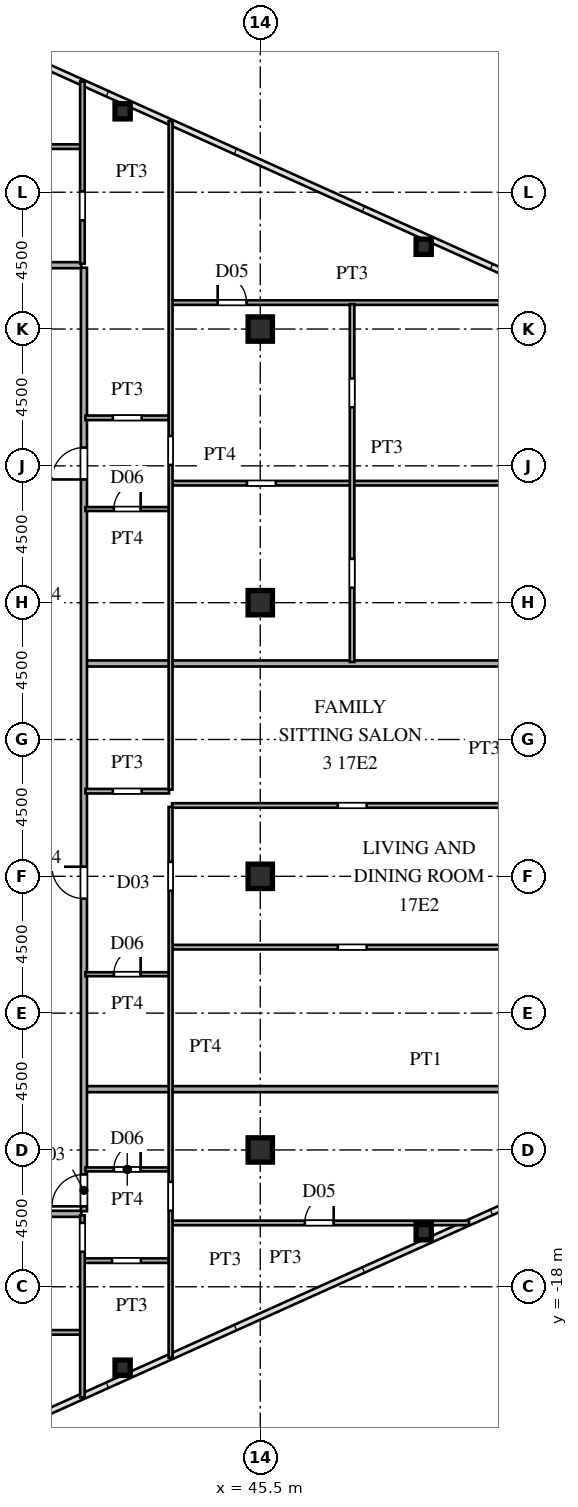
"""IFC4 building model, lengths in metres.
Left out: names, types, materials, properties, quantities, classifications, styles, units other than length and angle.
Written with IfcOpenShell. Run it as: python <this file> out.ifc"""

import sys

from ifc_helpers import new_model, si_unit, direction, frame, frame_2d, origin, origin_2d, place, context, subcontext, project, spatial, rectangle, hollow_rectangle, i_section, extrude, source, transform, mapped, element, fill, save


model = new_model("IFC4")
c1 = context("Model", 3, precision=1e-05, world=origin(), true_north=direction((0.0, 1.0)))
c2 = subcontext(c1, "Body", "Model", "MODEL_VIEW")
j1 = project(units=[si_unit("LENGTHUNIT", "METRE"), si_unit("PLANEANGLEUNIT", "RADIAN")], contexts=[c1])
p1 = place(None, origin())
s1 = spatial("IfcSite", under=j1, at=p1, CompositionType="ELEMENT")
p2 = place(p1, origin())
s2 = spatial("IfcBuilding", under=s1, at=p2, CompositionType="ELEMENT")
p3 = place(p2, frame((0.0, 0.0, 65.7)))
s3 = spatial("IfcBuildingStorey", under=s2, at=p3, CompositionType="ELEMENT", Elevation=65.7)
m1 = source(origin(), c2, "Body", "SweptSolid", [
    extrude(i_section(OverallWidth=0.8, OverallDepth=0.8, WebThickness=0.032, FlangeThickness=0.05, at=origin_2d()), origin(), (0.0, 0.0, 1.0), 3.6),
])
for number, where, z_axis, x_axis in (
    (1, (45.5, -13.5, 0.0), (0.0, 0.0, 1.0), (1.0, 0.0, 0.0)),
    (2, (45.5, -4.5, 0.0), (0.0, 0.0, 1.0), (1.0, 0.0, 0.0)),
    (3, (45.5, 4.5, 0.0), (0.0, 0.0, 1.0), (1.0, 0.0, 0.0)),
    (4, (45.5, 13.5, 0.0), (0.0, 0.0, 1.0), (1.0, 0.0, 0.0)),
):
    element("IfcColumn", number, at=place(p3, frame(where, z_axis=z_axis, x_axis=x_axis)), inside=s3, PredefinedType="COLUMN", context=c2, shape_type="MappedRepresentation", body=[
        mapped(m1, transform((0.0, 0.0, 0.0), scale=1.0)),
    ])
m2 = source(origin(), c2, "Body", "SweptSolid", [
    extrude(hollow_rectangle(XDim=0.5, YDim=0.5, WallThickness=0.02, at=origin_2d()), origin(), (0.0, 0.0, 1.0), 3.6),
])
for number, where, z_axis, x_axis in (
    (5, (40.973, -20.661, 0.0), (0.0, 0.0, 1.0), (1.0, 0.0, 0.0)),
    (6, (50.875, -16.205, 0.0), (0.0, 0.0, 1.0), (1.0, 0.0, 0.0)),
    (7, (40.973, 20.661, 0.0), (0.0, 0.0, 1.0), (1.0, 0.0, 0.0)),
    (8, (50.875, 16.205, 0.0), (0.0, 0.0, 1.0), (1.0, 0.0, 0.0)),
):
    element("IfcColumn", number, at=place(p3, frame(where, z_axis=z_axis, x_axis=x_axis)), inside=s3, PredefinedType="COLUMN", context=c2, shape_type="MappedRepresentation", body=[
        mapped(m2, transform((0.0, 0.0, 0.0), scale=1.0)),
    ])
p4 = place(p3, frame((27.465, -19.5, 0.0), z_axis=(0.0, 0.0, 1.0), x_axis=(1.0, 0.0, 0.0)))
e9 = element("IfcWall", 9, at=p4, inside=s3, PredefinedType="PARTITIONING", context=c2, shape_type="SweptSolid", body=[
    extrude(rectangle(XDim=12.135, YDim=0.15, at=frame_2d((6.067, 0.0))), origin(), (0.0, 0.0, 1.0), 3.38),
])
p5 = place(p4, frame((5.635, 0.0, 0.0)))
e10 = element("IfcOpeningElement", 10, at=p5, cuts=e9, PredefinedType="OPENING", context=c2, shape_type="SweptSolid", body=[
    extrude(rectangle(XDim=0.95, YDim=2.15, at=frame_2d((0.475, 1.075))), frame((0.0, 0.085, 0.0), z_axis=(0.0, -1.0, 0.0), x_axis=(1.0, 0.0, 0.0)), (0.0, 0.0, 1.0), 0.17),
])
p6 = place(p3, frame((39.7, -17.14, 0.0), z_axis=(0.0, 0.0, 1.0), x_axis=(1.0, 0.0, 0.0)))
e11 = element("IfcWall", 11, at=p6, inside=s3, PredefinedType="PARTITIONING", context=c2, shape_type="SweptSolid", body=[
    extrude(rectangle(XDim=2.8, YDim=0.15, at=frame_2d((1.4, 0.0))), origin(), (0.0, 0.0, 1.0), 3.38),
])
p7 = place(p6, frame((0.925, 0.0, 0.0)))
e12 = element("IfcOpeningElement", 12, at=p7, cuts=e11, PredefinedType="OPENING", context=c2, shape_type="SweptSolid", body=[
    extrude(rectangle(XDim=0.95, YDim=2.15, at=frame_2d((0.475, 1.075))), frame((0.0, 0.085, 0.0), z_axis=(0.0, -1.0, 0.0), x_axis=(1.0, 0.0, 0.0)), (0.0, 0.0, 1.0), 0.17),
])
p8 = place(p3, frame((42.6, -15.9, 0.0), z_axis=(0.0, 0.0, 1.0), x_axis=(1.0, 0.0, 0.0)))
e13 = element("IfcWall", 13, at=p8, inside=s3, PredefinedType="PARTITIONING", context=c2, shape_type="SweptSolid", body=[
    extrude(rectangle(XDim=9.765, YDim=0.15, at=frame_2d((4.882, 0.0))), origin(), (0.0, 0.0, 1.0), 3.38),
])
p9 = place(p8, frame((4.365, 0.0, 0.0)))
e14 = element("IfcOpeningElement", 14, at=p9, cuts=e13, PredefinedType="OPENING", context=c2, shape_type="SweptSolid", body=[
    extrude(rectangle(XDim=0.95, YDim=2.15, at=frame_2d((0.475, 1.075))), frame((0.0, 0.085, 0.0), z_axis=(0.0, -1.0, 0.0), x_axis=(1.0, 0.0, 0.0)), (0.0, 0.0, 1.0), 0.17),
])
p10 = place(p3, frame((36.585, -15.6, 0.0), z_axis=(0.0, 0.0, 1.0), x_axis=(1.0, 0.0, 0.0)))
e15 = element("IfcWall", 15, at=p10, inside=s3, PredefinedType="PARTITIONING", context=c2, shape_type="SweptSolid", body=[
    extrude(rectangle(XDim=3.03, YDim=0.2, at=frame_2d((1.515, 0.0))), origin(), (0.0, 0.0, 1.0), 3.38),
])
p11 = place(p3, frame((39.75, -14.14, 0.0), z_axis=(0.0, 0.0, 1.0), x_axis=(1.0, 0.0, 0.0)))
e16 = element("IfcWall", 16, at=p11, inside=s3, PredefinedType="PARTITIONING", context=c2, shape_type="SweptSolid", body=[
    extrude(rectangle(XDim=2.75, YDim=0.13, at=frame_2d((1.375, 0.0))), origin(), (0.0, 0.0, 1.0), 3.38),
])
p12 = place(p11, frame((0.935, 0.0, 0.0)))
e17 = element("IfcOpeningElement", 17, at=p12, cuts=e16, PredefinedType="OPENING", context=c2, shape_type="SweptSolid", body=[
    extrude(rectangle(XDim=0.88, YDim=2.1, at=frame_2d((0.44, 1.05))), frame((0.0, 0.075, 0.0), z_axis=(0.0, -1.0, 0.0), x_axis=(1.0, 0.0, 0.0)), (0.0, 0.0, 1.0), 0.15),
])
p13 = place(p3, frame((39.78, -11.5, 0.0), z_axis=(0.0, 0.0, 1.0), x_axis=(1.0, 0.0, 0.0)))
e18 = element("IfcWall", 18, at=p13, inside=s3, PredefinedType="PARTITIONING", context=c2, shape_type="SweptSolid", body=[
    extrude(rectangle(XDim=22.343, YDim=0.2, at=frame_2d((11.171, 0.0))), origin(), (0.0, 0.0, 1.0), 3.38),
])
p14 = place(p3, frame((39.75, -7.72, 0.0), z_axis=(0.0, 0.0, 1.0), x_axis=(1.0, 0.0, 0.0)))
e19 = element("IfcWall", 19, at=p14, inside=s3, PredefinedType="PARTITIONING", context=c2, shape_type="SweptSolid", body=[
    extrude(rectangle(XDim=2.75, YDim=0.13, at=frame_2d((1.375, 0.0))), origin(), (0.0, 0.0, 1.0), 3.38),
])
p15 = place(p14, frame((0.935, 0.0, 0.0)))
e20 = element("IfcOpeningElement", 20, at=p15, cuts=e19, PredefinedType="OPENING", context=c2, shape_type="SweptSolid", body=[
    extrude(rectangle(XDim=0.88, YDim=2.1, at=frame_2d((0.44, 1.05))), frame((0.0, 0.075, 0.0), z_axis=(0.0, -1.0, 0.0), x_axis=(1.0, 0.0, 0.0)), (0.0, 0.0, 1.0), 0.15),
])
p16 = place(p3, frame((42.6, -6.83, 0.0), z_axis=(0.0, 0.0, 1.0), x_axis=(1.0, 0.0, 0.0)))
e21 = element("IfcWall", 21, at=p16, inside=s3, PredefinedType="PARTITIONING", context=c2, shape_type="SweptSolid", body=[
    extrude(rectangle(XDim=28.275, YDim=0.15, at=frame_2d((14.137, 0.0))), origin(), (0.0, 0.0, 1.0), 3.38),
])
p17 = place(p16, frame((5.45, 0.0, 0.0)))
e22 = element("IfcOpeningElement", 22, at=p17, cuts=e21, PredefinedType="OPENING", context=c2, shape_type="SweptSolid", body=[
    extrude(rectangle(XDim=0.95, YDim=2.15, at=frame_2d((0.475, 1.075))), frame((0.0, 0.085, 0.0), z_axis=(0.0, -1.0, 0.0), x_axis=(1.0, 0.0, 0.0)), (0.0, 0.0, 1.0), 0.17),
])
p18 = place(p16, frame((14.275, 0.0, 0.0)))
e23 = element("IfcOpeningElement", 23, at=p18, cuts=e21, PredefinedType="OPENING", context=c2, shape_type="SweptSolid", body=[
    extrude(rectangle(XDim=0.95, YDim=2.15, at=frame_2d((0.475, 1.075))), frame((0.0, 0.085, 0.0), z_axis=(0.0, -1.0, 0.0), x_axis=(1.0, 0.0, 0.0)), (0.0, 0.0, 1.0), 0.17),
])
p19 = place(p3, frame((42.6, -2.17, 0.0), z_axis=(0.0, 0.0, 1.0), x_axis=(1.0, 0.0, 0.0)))
e24 = element("IfcWall", 24, at=p19, inside=s3, PredefinedType="PARTITIONING", context=c2, shape_type="SweptSolid", body=[
    extrude(rectangle(XDim=28.435, YDim=0.15, at=frame_2d((14.217, 0.0))), origin(), (0.0, 0.0, 1.0), 3.38),
])
p20 = place(p19, frame((5.45, 0.0, 0.0)))
e25 = element("IfcOpeningElement", 25, at=p20, cuts=e24, PredefinedType="OPENING", context=c2, shape_type="SweptSolid", body=[
    extrude(rectangle(XDim=0.95, YDim=2.15, at=frame_2d((0.475, 1.075))), frame((0.0, 0.085, 0.0), z_axis=(0.0, -1.0, 0.0), x_axis=(1.0, 0.0, 0.0)), (0.0, 0.0, 1.0), 0.17),
])
p21 = place(p19, frame((14.275, 0.0, 0.0)))
e26 = element("IfcOpeningElement", 26, at=p21, cuts=e24, PredefinedType="OPENING", context=c2, shape_type="SweptSolid", body=[
    extrude(rectangle(XDim=0.95, YDim=2.15, at=frame_2d((0.475, 1.075))), frame((0.0, 0.085, 0.0), z_axis=(0.0, -1.0, 0.0), x_axis=(1.0, 0.0, 0.0)), (0.0, 0.0, 1.0), 0.17),
])
p22 = place(p3, frame((39.75, -1.7, 0.0), z_axis=(0.0, 0.0, 1.0), x_axis=(1.0, 0.0, 0.0)))
e27 = element("IfcWall", 27, at=p22, inside=s3, PredefinedType="PARTITIONING", context=c2, shape_type="SweptSolid", body=[
    extrude(rectangle(XDim=2.75, YDim=0.15, at=frame_2d((1.375, 0.0))), origin(), (0.0, 0.0, 1.0), 3.38),
])
p23 = place(p22, frame((0.9, 0.0, 0.0)))
e28 = element("IfcOpeningElement", 28, at=p23, cuts=e27, PredefinedType="OPENING", context=c2, shape_type="SweptSolid", body=[
    extrude(rectangle(XDim=0.95, YDim=2.15, at=frame_2d((0.475, 1.075))), frame((0.0, 0.085, 0.0), z_axis=(0.0, -1.0, 0.0), x_axis=(1.0, 0.0, 0.0)), (0.0, 0.0, 1.0), 0.17),
])
p24 = place(p3, frame((39.78, 2.5, 0.0), z_axis=(0.0, 0.0, 1.0), x_axis=(1.0, 0.0, 0.0)))
e29 = element("IfcWall", 29, at=p24, inside=s3, PredefinedType="PARTITIONING", context=c2, shape_type="SweptSolid", body=[
    extrude(rectangle(XDim=31.225, YDim=0.2, at=frame_2d((15.612, 0.0))), origin(), (0.0, 0.0, 1.0), 3.38),
])
p25 = place(p3, frame((39.75, 7.58, 0.0), z_axis=(0.0, 0.0, 1.0), x_axis=(1.0, 0.0, 0.0)))
e30 = element("IfcWall", 30, at=p25, inside=s3, PredefinedType="PARTITIONING", context=c2, shape_type="SweptSolid", body=[
    extrude(rectangle(XDim=2.75, YDim=0.13, at=frame_2d((1.375, 0.0))), origin(), (0.0, 0.0, 1.0), 3.38),
])
p26 = place(p25, frame((0.935, 0.0, 0.0)))
e31 = element("IfcOpeningElement", 31, at=p26, cuts=e30, PredefinedType="OPENING", context=c2, shape_type="SweptSolid", body=[
    extrude(rectangle(XDim=0.88, YDim=2.1, at=frame_2d((0.44, 1.05))), frame((0.0, 0.075, 0.0), z_axis=(0.0, -1.0, 0.0), x_axis=(1.0, 0.0, 0.0)), (0.0, 0.0, 1.0), 0.15),
])
p27 = place(p3, frame((42.6, 8.43, 0.0), z_axis=(0.0, 0.0, 1.0), x_axis=(1.0, 0.0, 0.0)))
e32 = element("IfcWall", 32, at=p27, inside=s3, PredefinedType="PARTITIONING", context=c2, shape_type="SweptSolid", body=[
    extrude(rectangle(XDim=26.359, YDim=0.15, at=frame_2d((13.179, 0.0))), origin(), (0.0, 0.0, 1.0), 3.38),
])
p28 = place(p27, frame((2.462, 0.0, 0.0)))
e33 = element("IfcOpeningElement", 33, at=p28, cuts=e32, PredefinedType="OPENING", context=c2, shape_type="SweptSolid", body=[
    extrude(rectangle(XDim=0.95, YDim=2.15, at=frame_2d((0.475, 1.075))), frame((0.0, 0.085, 0.0), z_axis=(0.0, -1.0, 0.0), x_axis=(1.0, 0.0, 0.0)), (0.0, 0.0, 1.0), 0.17),
])
p29 = place(p3, frame((39.75, 10.58, 0.0), z_axis=(0.0, 0.0, 1.0), x_axis=(1.0, 0.0, 0.0)))
e34 = element("IfcWall", 34, at=p29, inside=s3, PredefinedType="PARTITIONING", context=c2, shape_type="SweptSolid", body=[
    extrude(rectangle(XDim=2.75, YDim=0.15, at=frame_2d((1.375, 0.0))), origin(), (0.0, 0.0, 1.0), 3.38),
])
p30 = place(p29, frame((0.9, 0.0, 0.0)))
e35 = element("IfcOpeningElement", 35, at=p30, cuts=e34, PredefinedType="OPENING", context=c2, shape_type="SweptSolid", body=[
    extrude(rectangle(XDim=0.95, YDim=2.15, at=frame_2d((0.475, 1.075))), frame((0.0, 0.085, 0.0), z_axis=(0.0, -1.0, 0.0), x_axis=(1.0, 0.0, 0.0)), (0.0, 0.0, 1.0), 0.17),
])
p31 = place(p3, frame((42.6, 14.37, 0.0), z_axis=(0.0, 0.0, 1.0), x_axis=(1.0, 0.0, 0.0)))
e36 = element("IfcWall", 36, at=p31, inside=s3, PredefinedType="PARTITIONING", context=c2, shape_type="SweptSolid", body=[
    extrude(rectangle(XDim=11.85, YDim=0.15, at=frame_2d((5.925, 0.0))), origin(), (0.0, 0.0, 1.0), 3.38),
])
p32 = place(p31, frame((1.5, 0.0, 0.0)))
e37 = element("IfcOpeningElement", 37, at=p32, cuts=e36, PredefinedType="OPENING", context=c2, shape_type="SweptSolid", body=[
    extrude(rectangle(XDim=0.95, YDim=2.15, at=frame_2d((0.475, 1.075))), frame((0.0, 0.085, 0.0), z_axis=(0.0, -1.0, 0.0), x_axis=(1.0, 0.0, 0.0)), (0.0, 0.0, 1.0), 0.17),
])
p33 = place(p3, frame((36.585, 15.6, 0.0), z_axis=(0.0, 0.0, 1.0), x_axis=(1.0, 0.0, 0.0)))
e38 = element("IfcWall", 38, at=p33, inside=s3, PredefinedType="PARTITIONING", context=c2, shape_type="SweptSolid", body=[
    extrude(rectangle(XDim=3.03, YDim=0.2, at=frame_2d((1.515, 0.0))), origin(), (0.0, 0.0, 1.0), 3.38),
])
p34 = place(p3, frame((27.465, 19.5, 0.0), z_axis=(0.0, 0.0, 1.0), x_axis=(1.0, 0.0, 0.0)))
e39 = element("IfcWall", 39, at=p34, inside=s3, PredefinedType="PARTITIONING", context=c2, shape_type="SweptSolid", body=[
    extrude(rectangle(XDim=12.135, YDim=0.15, at=frame_2d((6.067, 0.0))), origin(), (0.0, 0.0, 1.0), 3.38),
])
p35 = place(p34, frame((5.635, 0.0, 0.0)))
e40 = element("IfcOpeningElement", 40, at=p35, cuts=e39, PredefinedType="OPENING", context=c2, shape_type="SweptSolid", body=[
    extrude(rectangle(XDim=0.95, YDim=2.15, at=frame_2d((0.475, 1.075))), frame((0.0, 0.085, 0.0), z_axis=(0.0, -1.0, 0.0), x_axis=(1.0, 0.0, 0.0)), (0.0, 0.0, 1.0), 0.17),
])
p36 = place(p3, frame((39.65, -21.642, 0.0), z_axis=(0.0, 0.0, 1.0), x_axis=(0.0, 1.0, 0.0)))
e41 = element("IfcWall", 41, at=p36, inside=s3, PredefinedType="PARTITIONING", context=c2, shape_type="SweptSolid", body=[
    extrude(rectangle(XDim=5.992, YDim=0.15, at=frame_2d((2.996, 0.0))), origin(), (0.0, 0.0, 1.0), 3.38),
])
p37 = place(p36, frame((4.794, 0.0, 0.0)))
e42 = element("IfcOpeningElement", 42, at=p37, cuts=e41, PredefinedType="OPENING", context=c2, shape_type="SweptSolid", body=[
    extrude(rectangle(XDim=0.95, YDim=2.15, at=frame_2d((0.475, 1.075))), frame((0.0, 0.085, 0.0), z_axis=(0.0, -1.0, 0.0), x_axis=(1.0, 0.0, 0.0)), (0.0, 0.0, 1.0), 0.17),
])
p38 = place(p3, frame((39.65, 15.65, 0.0), z_axis=(0.0, 0.0, 1.0), x_axis=(0.0, 1.0, 0.0)))
e43 = element("IfcWall", 43, at=p38, inside=s3, PredefinedType="PARTITIONING", context=c2, shape_type="SweptSolid", body=[
    extrude(rectangle(XDim=5.992, YDim=0.15, at=frame_2d((2.996, 0.0))), origin(), (0.0, 0.0, 1.0), 3.38),
])
p39 = place(p38, frame((1.425, 0.0, 0.0)))
e44 = element("IfcOpeningElement", 44, at=p39, cuts=e43, PredefinedType="OPENING", context=c2, shape_type="SweptSolid", body=[
    extrude(rectangle(XDim=0.95, YDim=2.15, at=frame_2d((0.475, 1.075))), frame((0.0, 0.085, 0.0), z_axis=(0.0, -1.0, 0.0), x_axis=(1.0, 0.0, 0.0)), (0.0, 0.0, 1.0), 0.17),
])
p40 = place(p3, frame((39.7, -15.515, 0.0), z_axis=(0.0, 0.0, 1.0), x_axis=(0.0, 1.0, 0.0)))
e45 = element("IfcWall", 45, at=p40, inside=s3, PredefinedType="PARTITIONING", context=c2, shape_type="SweptSolid", body=[
    extrude(rectangle(XDim=31.03, YDim=0.2, at=frame_2d((15.515, 0.0))), origin(), (0.0, 0.0, 1.0), 3.38),
])
p41 = place(p40, frame((0.16, 0.0, 0.0)))
e46 = element("IfcOpeningElement", 46, at=p41, cuts=e45, PredefinedType="OPENING", context=c2, shape_type="SweptSolid", body=[
    extrude(rectangle(XDim=1.05, YDim=2.25, at=frame_2d((0.525, 1.125))), frame((0.0, 0.11, 0.0), z_axis=(0.0, -1.0, 0.0), x_axis=(1.0, 0.0, 0.0)), (0.0, 0.0, 1.0), 0.22),
])
p42 = place(p40, frame((10.28, 0.0, 0.0)))
e47 = element("IfcOpeningElement", 47, at=p42, cuts=e45, PredefinedType="OPENING", context=c2, shape_type="SweptSolid", body=[
    extrude(rectangle(XDim=1.05, YDim=2.25, at=frame_2d((0.525, 1.125))), frame((0.0, 0.11, 0.0), z_axis=(0.0, -1.0, 0.0), x_axis=(1.0, 0.0, 0.0)), (0.0, 0.0, 1.0), 0.22),
])
p43 = place(p40, frame((24.067, 0.0, 0.0)))
e48 = element("IfcOpeningElement", 48, at=p43, cuts=e45, PredefinedType="OPENING", context=c2, shape_type="SweptSolid", body=[
    extrude(rectangle(XDim=1.05, YDim=2.25, at=frame_2d((0.525, 1.125))), frame((0.0, 0.11, 0.0), z_axis=(0.0, -1.0, 0.0), x_axis=(1.0, 0.0, 0.0)), (0.0, 0.0, 1.0), 0.22),
])
p44 = place(p3, frame((42.55, -20.337, 0.0), z_axis=(0.0, 0.0, 1.0), x_axis=(0.0, 1.0, 0.0)))
e49 = element("IfcWall", 49, at=p44, inside=s3, PredefinedType="PARTITIONING", context=c2, shape_type="SweptSolid", body=[
    extrude(rectangle(XDim=18.12, YDim=0.13, at=frame_2d((9.06, 0.0))), origin(), (0.0, 0.0, 1.0), 3.38),
])
p45 = place(p44, frame((4.839, 0.0, 0.0)))
e50 = element("IfcOpeningElement", 50, at=p45, cuts=e49, PredefinedType="OPENING", context=c2, shape_type="SweptSolid", body=[
    extrude(rectangle(XDim=0.95, YDim=2.15, at=frame_2d((0.475, 1.075))), frame((0.0, 0.075, 0.0), z_axis=(0.0, -1.0, 0.0), x_axis=(1.0, 0.0, 0.0)), (0.0, 0.0, 1.0), 0.15),
])
p46 = place(p44, frame((15.362, 0.0, 0.0)))
e51 = element("IfcOpeningElement", 51, at=p46, cuts=e49, PredefinedType="OPENING", context=c2, shape_type="SweptSolid", body=[
    extrude(rectangle(XDim=0.95, YDim=2.15, at=frame_2d((0.475, 1.075))), frame((0.0, 0.075, 0.0), z_axis=(0.0, -1.0, 0.0), x_axis=(1.0, 0.0, 0.0)), (0.0, 0.0, 1.0), 0.15),
])
p47 = place(p3, frame((42.55, -1.648, 0.0), z_axis=(0.0, 0.0, 1.0), x_axis=(0.0, 1.0, 0.0)))
e52 = element("IfcWall", 52, at=p47, inside=s3, PredefinedType="PARTITIONING", context=c2, shape_type="SweptSolid", body=[
    extrude(rectangle(XDim=21.985, YDim=0.13, at=frame_2d((10.992, 0.0))), origin(), (0.0, 0.0, 1.0), 3.38),
])
p48 = place(p47, frame((10.679, 0.0, 0.0)))
e53 = element("IfcOpeningElement", 53, at=p48, cuts=e52, PredefinedType="OPENING", context=c2, shape_type="SweptSolid", body=[
    extrude(rectangle(XDim=0.95, YDim=2.15, at=frame_2d((0.475, 1.075))), frame((0.0, 0.075, 0.0), z_axis=(0.0, -1.0, 0.0), x_axis=(1.0, 0.0, 0.0)), (0.0, 0.0, 1.0), 0.15),
])
p49 = place(p3, frame((48.52, 2.55, 0.0), z_axis=(0.0, 0.0, 1.0), x_axis=(0.0, 1.0, 0.0)))
e54 = element("IfcWall", 54, at=p49, inside=s3, PredefinedType="PARTITIONING", context=c2, shape_type="SweptSolid", body=[
    extrude(rectangle(XDim=11.768, YDim=0.15, at=frame_2d((5.884, 0.0))), origin(), (0.0, 0.0, 1.0), 3.38),
])
p50 = place(p49, frame((8.376, 0.0, 0.0)))
e55 = element("IfcOpeningElement", 55, at=p50, cuts=e54, PredefinedType="OPENING", context=c2, shape_type="SweptSolid", body=[
    extrude(rectangle(XDim=0.95, YDim=2.15, at=frame_2d((0.475, 1.075))), frame((0.0, 0.085, 0.0), z_axis=(0.0, -1.0, 0.0), x_axis=(1.0, 0.0, 0.0)), (0.0, 0.0, 1.0), 0.17),
])
p51 = place(p49, frame((2.442, 0.0, 0.0)))
e56 = element("IfcOpeningElement", 56, at=p51, cuts=e54, PredefinedType="OPENING", context=c2, shape_type="SweptSolid", body=[
    extrude(rectangle(XDim=0.95, YDim=2.15, at=frame_2d((0.475, 1.075))), frame((0.0, 0.085, 0.0), z_axis=(0.0, -1.0, 0.0), x_axis=(1.0, 0.0, 0.0)), (0.0, 0.0, 1.0), 0.17),
])
m3 = source(origin(), c2, "Body", "SweptSolid", [
    extrude(rectangle(XDim=0.95, YDim=2.15, at=frame_2d((0.475, 1.075))), frame((0.0, 0.025, 0.0), z_axis=(0.0, -1.0, 0.0), x_axis=(1.0, 0.0, 0.0)), (0.0, 0.0, 1.0), 0.05),
])
p52 = place(p9, origin())
e57 = element("IfcDoor", 57, at=p52, inside=s3, OperationType="SINGLE_SWING_RIGHT", PredefinedType="DOOR", context=c2, shape_type="MappedRepresentation", body=[
    mapped(m3, transform((0.0, 0.0, 0.0), scale=1.0)),
])
fill(e14, e57)
m4 = source(origin(), c2, "Body", "SweptSolid", [
    extrude(rectangle(XDim=0.88, YDim=2.1, at=frame_2d((0.44, 1.05))), frame((0.0, 0.025, 0.0), z_axis=(0.0, -1.0, 0.0), x_axis=(1.0, 0.0, 0.0)), (0.0, 0.0, 1.0), 0.05),
])
p53 = place(p12, origin())
e58 = element("IfcDoor", 58, at=p53, inside=s3, OperationType="SINGLE_SWING_RIGHT", PredefinedType="DOOR", context=c2, shape_type="MappedRepresentation", body=[
    mapped(m4, transform((0.0, 0.0, 0.0), scale=1.0)),
])
fill(e17, e58)
p54 = place(p15, origin())
e59 = element("IfcDoor", 59, at=p54, inside=s3, OperationType="SINGLE_SWING_RIGHT", PredefinedType="DOOR", context=c2, shape_type="MappedRepresentation", body=[
    mapped(m4, transform((0.0, 0.0, 0.0), scale=1.0)),
])
fill(e20, e59)
p55 = place(p26, origin())
e60 = element("IfcDoor", 60, at=p55, inside=s3, OperationType="SINGLE_SWING_RIGHT", PredefinedType="DOOR", context=c2, shape_type="MappedRepresentation", body=[
    mapped(m4, transform((0.0, 0.0, 0.0), scale=1.0)),
])
fill(e31, e60)
p56 = place(p32, origin())
e61 = element("IfcDoor", 61, at=p56, inside=s3, OperationType="SINGLE_SWING_LEFT", PredefinedType="DOOR", context=c2, shape_type="MappedRepresentation", body=[
    mapped(m3, transform((0.0, 0.0, 0.0), scale=1.0)),
])
fill(e37, e61)
m5 = source(origin(), c2, "Body", "SweptSolid", [
    extrude(rectangle(XDim=1.05, YDim=2.25, at=frame_2d((0.525, 1.125))), frame((0.0, 0.025, 0.0), z_axis=(0.0, -1.0, 0.0), x_axis=(1.0, 0.0, 0.0)), (0.0, 0.0, 1.0), 0.05),
])
p57 = place(p41, origin())
e62 = element("IfcDoor", 62, at=p57, inside=s3, OperationType="SINGLE_SWING_LEFT", PredefinedType="DOOR", context=c2, shape_type="MappedRepresentation", body=[
    mapped(m5, transform((0.0, 0.0, 0.0), scale=1.0)),
])
fill(e46, e62)
p58 = place(p42, origin())
e63 = element("IfcDoor", 63, at=p58, inside=s3, OperationType="SINGLE_SWING_RIGHT", PredefinedType="DOOR", context=c2, shape_type="MappedRepresentation", body=[
    mapped(m5, transform((0.0, 0.0, 0.0), scale=1.0)),
])
fill(e47, e63)
p59 = place(p43, origin())
e64 = element("IfcDoor", 64, at=p59, inside=s3, OperationType="SINGLE_SWING_LEFT", PredefinedType="DOOR", context=c2, shape_type="MappedRepresentation", body=[
    mapped(m5, transform((0.0, 0.0, 0.0), scale=1.0)),
])
fill(e48, e64)
save(model, sys.argv[1])
